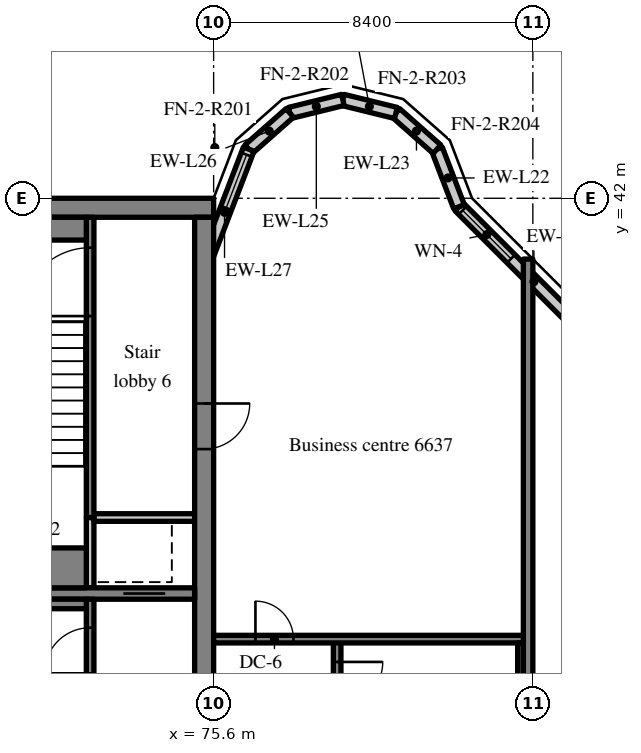
"""IFC4 building model, lengths in metres.
Left out: names, types, materials, properties, quantities, classifications, styles, units other than length and angle.
Written with IfcOpenShell. Run it as: python <this file> out.ifc"""

import sys

from ifc_helpers import new_model, si_unit, direction, frame, frame_2d, origin, place, context, subcontext, project, spatial, rectangle, extrude, source, transform, mapped, element, fill, save


model = new_model("IFC4")
c1 = context("Model", 3, precision=1e-05, world=origin(), true_north=direction((0.0, 1.0)))
c2 = subcontext(c1, "Body", "Model", "MODEL_VIEW")
j1 = project(units=[si_unit("LENGTHUNIT", "METRE"), si_unit("PLANEANGLEUNIT", "RADIAN")], contexts=[c1])
p1 = place(None, origin())
s1 = spatial("IfcSite", under=j1, at=p1, CompositionType="ELEMENT")
p2 = place(p1, origin())
s2 = spatial("IfcBuilding", under=s1, at=p2, CompositionType="ELEMENT")
p3 = place(p2, frame((0.0, 0.0, 277.7)))
s3 = spatial("IfcBuildingStorey", under=s2, at=p3, CompositionType="ELEMENT", Elevation=277.7)
m1 = source(origin(), c2, "Body", "SweptSolid", [
    extrude(rectangle(XDim=50.4, YDim=0.5, at=frame_2d((25.2, 0.0))), origin(), (0.0, 0.0, 1.0), 3.72),
])
p4 = place(p3, frame((25.2, 41.75, 0.0), z_axis=(0.0, 0.0, 1.0), x_axis=(1.0, 0.0, 0.0)))
e1 = element("IfcWall", 1, at=p4, inside=s3, PredefinedType="SHEAR", context=c2, shape_type="MappedRepresentation", body=[
    mapped(m1, transform((0.0, 0.0, 0.0), scale=1.0)),
])
m2 = source(origin(), c2, "Body", "SweptSolid", [
    extrude(rectangle(XDim=19.0, YDim=0.5, at=frame_2d((9.5, 0.0))), origin(), (0.0, 0.0, 1.0), 3.72),
])
p5 = place(p3, frame((75.35, 22.5, 0.0), z_axis=(0.0, 0.0, 1.0), x_axis=(0.0, 1.0, 0.0)))
e2 = element("IfcWall", 2, at=p5, inside=s3, PredefinedType="SHEAR", context=c2, shape_type="MappedRepresentation", body=[
    mapped(m2, transform((0.0, 0.0, 0.0), scale=1.0)),
])
m3 = source(origin(), c2, "Body", "SweptSolid", [
    extrude(rectangle(XDim=1.2, YDim=2.1, at=frame_2d((0.6, 1.05))), frame((0.0, 0.26, 0.0), z_axis=(0.0, -1.0, 0.0), x_axis=(1.0, 0.0, 0.0)), (0.0, 0.0, 1.0), 0.52),
])
p6 = place(p5, frame((12.9, 0.0, 0.0)))
e3 = element("IfcOpeningElement", 3, at=p6, cuts=e2, PredefinedType="OPENING", context=c2, shape_type="MappedRepresentation", body=[
    mapped(m3, transform((0.0, 0.0, 0.0), scale=1.0)),
])
m4 = source(origin(), c2, "Body", "SweptSolid", [
    extrude(rectangle(XDim=7.75, YDim=0.3, at=frame_2d((3.875, 0.0))), origin(), (0.0, 0.0, 1.0), 3.72),
])
p7 = place(p3, frame((67.35, 31.6, 0.0), z_axis=(0.0, 0.0, 1.0), x_axis=(1.0, 0.0, 0.0)))
e4 = element("IfcWall", 4, at=p7, inside=s3, PredefinedType="SHEAR", context=c2, shape_type="MappedRepresentation", body=[
    mapped(m4, transform((0.0, 0.0, 0.0), scale=1.0)),
])
m5 = source(origin(), c2, "Body", "SweptSolid", [
    extrude(rectangle(XDim=1.1, YDim=2.1, at=frame_2d((0.55, 1.05))), frame((0.0, 0.16, 0.0), z_axis=(0.0, -1.0, 0.0), x_axis=(1.0, 0.0, 0.0)), (0.0, 0.0, 1.0), 0.32),
])
p8 = place(p7, frame((5.875, 0.0, 0.0)))
e5 = element("IfcOpeningElement", 5, at=p8, cuts=e4, PredefinedType="OPENING", context=c2, shape_type="MappedRepresentation", body=[
    mapped(m5, transform((0.0, 0.0, 0.0), scale=1.0)),
])
m6 = source(origin(), c2, "Body", "SweptSolid", [
    extrude(rectangle(XDim=18.4, YDim=0.25, at=frame_2d((9.2, 0.0))), origin(), (0.0, 0.0, 1.0), 3.72),
])
p9 = place(p3, frame((83.875, 22.0, 0.0), z_axis=(0.0, 0.0, 1.0), x_axis=(0.0, 1.0, 0.0)))
e6 = element("IfcWall", 6, at=p9, inside=s3, PredefinedType="SHEAR", context=c2, shape_type="MappedRepresentation", body=[
    mapped(m6, transform((0.0, 0.0, 0.0), scale=1.0)),
])
m7 = source(origin(), c2, "Body", "SweptSolid", [
    extrude(rectangle(XDim=5.576, YDim=0.3, at=frame_2d((2.788, 0.0))), origin(), (0.0, 0.0, 1.0), 3.72),
])
p10 = place(p3, frame((86.0, 37.834, 0.0), z_axis=(0.0, 0.0, 1.0), x_axis=(-0.707106781187, 0.707106781187, 0.0)))
e7 = element("IfcWall", 7, at=p10, inside=s3, PredefinedType="SOLIDWALL", context=c2, shape_type="MappedRepresentation", body=[
    mapped(m7, transform((0.0, 0.0, 0.0), scale=1.0)),
])
m8 = source(origin(), c2, "Body", "SweptSolid", [
    extrude(rectangle(XDim=1.8, YDim=1.5, at=frame_2d((0.9, 0.75))), frame((0.0, 0.16, 0.0), z_axis=(0.0, -1.0, 0.0), x_axis=(1.0, 0.0, 0.0)), (0.0, 0.0, 1.0), 0.32),
])
p11 = place(p10, frame((3.641, 0.0, 0.9)))
e8 = element("IfcOpeningElement", 8, at=p11, cuts=e7, PredefinedType="OPENING", context=c2, shape_type="MappedRepresentation", body=[
    mapped(m8, transform((0.0, 0.0, 0.0), scale=1.0)),
])
m9 = source(origin(), c2, "Body", "SweptSolid", [
    extrude(rectangle(XDim=1.622, YDim=0.3, at=frame_2d((0.811, 0.0))), origin(), (0.0, 0.0, 1.0), 3.72),
])
p12 = place(p3, frame((82.057, 41.777, 0.0), z_axis=(0.0, 0.0, 1.0), x_axis=(-0.357778527068, 0.933806471154, 0.0)))
e9 = element("IfcWall", 9, at=p12, inside=s3, PredefinedType="SOLIDWALL", context=c2, shape_type="MappedRepresentation", body=[
    mapped(m9, transform((0.0, 0.0, 0.0), scale=1.0)),
])
m10 = source(origin(), c2, "Body", "SweptSolid", [
    extrude(rectangle(XDim=1.44, YDim=0.3, at=frame_2d((0.72, 0.0))), origin(), (0.0, 0.0, 1.0), 3.72),
])
p13 = place(p3, frame((81.477, 43.292, 0.0), z_axis=(0.0, 0.0, 1.0), x_axis=(-0.74957555648, 0.661918790432, 0.0)))
e10 = element("IfcWall", 10, at=p13, inside=s3, PredefinedType="SOLIDWALL", context=c2, shape_type="MappedRepresentation", body=[
    mapped(m10, transform((0.0, 0.0, 0.0), scale=1.0)),
])
m11 = source(origin(), c2, "Body", "SweptSolid", [
    extrude(rectangle(XDim=1.439, YDim=0.3, at=frame_2d((0.719, 0.0))), origin(), (0.0, 0.0, 1.0), 3.72),
])
for number, where, z_axis, x_axis in (
    (11, (80.397, 44.245, 0.0), (0.0, 0.0, 1.0), (-0.971, 0.238, 0.0)),
    (12, (79.0, 44.588, 0.0), (0.0, 0.0, 1.0), (-0.971, -0.238, 0.0)),
):
    element("IfcWall", number, at=place(p3, frame(where, z_axis=z_axis, x_axis=x_axis)), inside=s3, PredefinedType="SOLIDWALL", context=c2, shape_type="MappedRepresentation", body=[
        mapped(m11, transform((0.0, 0.0, 0.0), scale=1.0)),
    ])
p14 = place(p3, frame((77.603, 44.245, 0.0), z_axis=(0.0, 0.0, 1.0), x_axis=(-0.74957555648, -0.661918790432, 0.0)))
e13 = element("IfcWall", 13, at=p14, inside=s3, PredefinedType="SOLIDWALL", context=c2, shape_type="MappedRepresentation", body=[
    mapped(m10, transform((0.0, 0.0, 0.0), scale=1.0)),
])
m12 = source(origin(), c2, "Body", "SweptSolid", [
    extrude(rectangle(XDim=3.559, YDim=0.3, at=frame_2d((1.78, 0.0))), origin(), (0.0, 0.0, 1.0), 3.72),
])
p15 = place(p3, frame((76.523, 43.292, 0.0), z_axis=(0.0, 0.0, 1.0), x_axis=(-0.35779745313, -0.933799219604, 0.0)))
e14 = element("IfcWall", 14, at=p15, inside=s3, PredefinedType="SOLIDWALL", context=c2, shape_type="MappedRepresentation", body=[
    mapped(m12, transform((0.0, 0.0, 0.0), scale=1.0)),
])
m13 = source(origin(), c2, "Body", "SweptSolid", [
    extrude(rectangle(XDim=1.5, YDim=2.0, at=frame_2d((0.75, 1.0))), frame((0.0, 0.16, 0.0), z_axis=(0.0, -1.0, 0.0), x_axis=(1.0, 0.0, 0.0)), (0.0, 0.0, 1.0), 0.32),
])
p16 = place(p15, frame((0.156, 0.0, 0.9)))
e15 = element("IfcOpeningElement", 15, at=p16, cuts=e14, PredefinedType="OPENING", context=c2, shape_type="MappedRepresentation", body=[
    mapped(m13, transform((0.0, 0.0, 0.0), scale=1.0)),
])
m14 = source(origin(), c2, "Body", "SweptSolid", [
    extrude(rectangle(XDim=8.95, YDim=0.2, at=frame_2d((4.475, 0.0))), origin(), (0.0, 0.0, 1.0), 3.72),
])
p17 = place(p3, frame((72.35, 22.5, 0.0), z_axis=(0.0, 0.0, 1.0), x_axis=(0.0, 1.0, 0.0)))
e16 = element("IfcWall", 16, at=p17, inside=s3, PredefinedType="SOLIDWALL", context=c2, shape_type="MappedRepresentation", body=[
    mapped(m14, transform((0.0, 0.0, 0.0), scale=1.0)),
])
m15 = source(origin(), c2, "Body", "SweptSolid", [
    extrude(rectangle(XDim=1.2, YDim=2.1, at=frame_2d((0.6, 1.05))), frame((0.0, 0.11, 0.0), z_axis=(0.0, -1.0, 0.0), x_axis=(1.0, 0.0, 0.0)), (0.0, 0.0, 1.0), 0.22),
])
p18 = place(p17, frame((7.0, 0.0, 0.0)))
e17 = element("IfcOpeningElement", 17, at=p18, cuts=e16, PredefinedType="OPENING", context=c2, shape_type="MappedRepresentation", body=[
    mapped(m15, transform((0.0, 0.0, 0.0), scale=1.0)),
])
m16 = source(origin(), c2, "Body", "SweptSolid", [
    extrude(rectangle(XDim=1.85, YDim=0.2, at=frame_2d((0.925, 0.0))), origin(), (0.0, 0.0, 1.0), 3.72),
])
p19 = place(p3, frame((72.35, 31.75, 0.0), z_axis=(0.0, 0.0, 1.0), x_axis=(0.0, 1.0, 0.0)))
e18 = element("IfcWall", 18, at=p19, inside=s3, PredefinedType="SOLIDWALL", context=c2, shape_type="MappedRepresentation", body=[
    mapped(m16, transform((0.0, 0.0, 0.0), scale=1.0)),
])
m17 = source(origin(), c2, "Body", "SweptSolid", [
    extrude(rectangle(XDim=2.65, YDim=0.2, at=frame_2d((1.325, 0.0))), origin(), (0.0, 0.0, 1.0), 3.72),
])
p20 = place(p3, frame((72.45, 33.6, 0.0), z_axis=(0.0, 0.0, 1.0), x_axis=(1.0, 0.0, 0.0)))
e19 = element("IfcWall", 19, at=p20, inside=s3, PredefinedType="SOLIDWALL", context=c2, shape_type="MappedRepresentation", body=[
    mapped(m17, transform((0.0, 0.0, 0.0), scale=1.0)),
])
m18 = source(origin(), c2, "Body", "SweptSolid", [
    extrude(rectangle(XDim=7.9, YDim=0.2, at=frame_2d((3.95, 0.0))), origin(), (0.0, 0.0, 1.0), 3.72),
])
p21 = place(p3, frame((72.35, 33.6, 0.0), z_axis=(0.0, 0.0, 1.0), x_axis=(0.0, 1.0, 0.0)))
e20 = element("IfcWall", 20, at=p21, inside=s3, PredefinedType="SOLIDWALL", context=c2, shape_type="MappedRepresentation", body=[
    mapped(m18, transform((0.0, 0.0, 0.0), scale=1.0)),
])
m19 = source(origin(), c2, "Body", "SweptSolid", [
    extrude(rectangle(XDim=1.8, YDim=2.1, at=frame_2d((0.9, 1.05))), frame((0.0, 0.11, 0.0), z_axis=(0.0, -1.0, 0.0), x_axis=(1.0, 0.0, 0.0)), (0.0, 0.0, 1.0), 0.22),
])
p22 = place(p21, frame((5.3, 0.0, 0.0)))
e21 = element("IfcOpeningElement", 21, at=p22, cuts=e20, PredefinedType="OPENING", context=c2, shape_type="MappedRepresentation", body=[
    mapped(m19, transform((0.0, 0.0, 0.0), scale=1.0)),
])
m20 = source(origin(), c2, "Body", "SweptSolid", [
    extrude(rectangle(XDim=8.3, YDim=0.2, at=frame_2d((4.15, 0.0))), origin(), (0.0, 0.0, 1.0), 3.72),
])
p23 = place(p3, frame((78.85, 22.1, 0.0), z_axis=(0.0, 0.0, 1.0), x_axis=(0.0, 1.0, 0.0)))
e22 = element("IfcWall", 22, at=p23, inside=s3, PredefinedType="SOLIDWALL", context=c2, shape_type="MappedRepresentation", body=[
    mapped(m20, transform((0.0, 0.0, 0.0), scale=1.0)),
])
p24 = place(p23, frame((6.5, 0.0, 0.0)))
e23 = element("IfcOpeningElement", 23, at=p24, cuts=e22, PredefinedType="OPENING", context=c2, shape_type="MappedRepresentation", body=[
    mapped(m15, transform((0.0, 0.0, 0.0), scale=1.0)),
])
m21 = source(origin(), c2, "Body", "SweptSolid", [
    extrude(rectangle(XDim=8.15, YDim=0.2, at=frame_2d((4.075, 0.0))), origin(), (0.0, 0.0, 1.0), 3.72),
])
p25 = place(p3, frame((83.75, 30.4, 0.0), z_axis=(0.0, 0.0, 1.0), x_axis=(-1.0, 0.0, 0.0)))
e24 = element("IfcWall", 24, at=p25, inside=s3, PredefinedType="SOLIDWALL", context=c2, shape_type="MappedRepresentation", body=[
    mapped(m21, transform((0.0, 0.0, 0.0), scale=1.0)),
])
m22 = source(origin(), c2, "Body", "SweptSolid", [
    extrude(rectangle(XDim=1.0, YDim=2.1, at=frame_2d((0.5, 1.05))), frame((0.0, 0.11, 0.0), z_axis=(0.0, -1.0, 0.0), x_axis=(1.0, 0.0, 0.0)), (0.0, 0.0, 1.0), 0.22),
])
p26 = place(p25, frame((6.05, 0.0, 0.0)))
e25 = element("IfcOpeningElement", 25, at=p26, cuts=e24, PredefinedType="OPENING", context=c2, shape_type="MappedRepresentation", body=[
    mapped(m22, transform((0.0, 0.0, 0.0), scale=1.0)),
])
m23 = source(origin(), c2, "Body", "SweptSolid", [
    extrude(rectangle(XDim=4.9, YDim=0.25, at=frame_2d((2.45, 0.0))), origin(), (0.0, 0.0, 1.0), 3.72),
])
p27 = place(p3, frame((67.35, 31.325, 0.0), z_axis=(0.0, 0.0, 1.0), x_axis=(1.0, 0.0, 0.0)))
e26 = element("IfcWall", 26, at=p27, inside=s3, PredefinedType="SOLIDWALL", context=c2, shape_type="MappedRepresentation", body=[
    mapped(m23, transform((0.0, 0.0, 0.0), scale=1.0)),
])
m24 = source(origin(), c2, "Body", "SweptSolid", [
    extrude(rectangle(XDim=4.9, YDim=0.6, at=frame_2d((2.45, 0.0))), origin(), (0.0, 0.0, 1.0), 3.72),
])
p28 = place(p3, frame((67.35, 41.2, 0.0), z_axis=(0.0, 0.0, 1.0), x_axis=(1.0, 0.0, 0.0)))
e27 = element("IfcWall", 27, at=p28, inside=s3, PredefinedType="SOLIDWALL", context=c2, shape_type="MappedRepresentation", body=[
    mapped(m24, transform((0.0, 0.0, 0.0), scale=1.0)),
])
m25 = source(origin(), c2, "Body", "SweptSolid", [
    extrude(rectangle(XDim=4.9, YDim=1.05, at=frame_2d((2.45, 0.0))), origin(), (0.0, 0.0, 1.0), 3.72),
])
p29 = place(p3, frame((67.35, 32.275, 0.0), z_axis=(0.0, 0.0, 1.0), x_axis=(1.0, 0.0, 0.0)))
e28 = element("IfcWall", 28, at=p29, inside=s3, PredefinedType="SOLIDWALL", context=c2, shape_type="MappedRepresentation", body=[
    mapped(m25, transform((0.0, 0.0, 0.0), scale=1.0)),
])
m26 = source(origin(), c2, "Body", "SweptSolid", [
    extrude(rectangle(XDim=8.1, YDim=0.15, at=frame_2d((4.05, 0.0))), origin(), (0.0, 0.0, 1.0), 3.72),
])
p30 = place(p3, frame((83.675, 22.2, 0.0), z_axis=(0.0, 0.0, 1.0), x_axis=(0.0, 1.0, 0.0)))
e29 = element("IfcWall", 29, at=p30, inside=s3, PredefinedType="SOLIDWALL", context=c2, shape_type="MappedRepresentation", body=[
    mapped(m26, transform((0.0, 0.0, 0.0), scale=1.0)),
])
m27 = source(origin(), c2, "Body", "SweptSolid", [
    extrude(rectangle(XDim=1.8, YDim=1.5, at=frame_2d((0.9, 0.75))), frame((0.0, 0.03, 0.0), z_axis=(0.0, -1.0, 0.0), x_axis=(1.0, 0.0, 0.0)), (0.0, 0.0, 1.0), 0.06),
])
p31 = place(p11, origin())
e30 = element("IfcWindow", 30, at=p31, inside=s3, PartitioningType="SINGLE_PANEL", PredefinedType="WINDOW", context=c2, shape_type="MappedRepresentation", body=[
    mapped(m27, transform((0.0, 0.0, 0.0), scale=1.0)),
])
fill(e8, e30)
m28 = source(origin(), c2, "Body", "SweptSolid", [
    extrude(rectangle(XDim=1.5, YDim=2.0, at=frame_2d((0.75, 1.0))), frame((0.0, 0.03, 0.0), z_axis=(0.0, -1.0, 0.0), x_axis=(1.0, 0.0, 0.0)), (0.0, 0.0, 1.0), 0.06),
])
p32 = place(p16, origin())
e31 = element("IfcWindow", 31, at=p32, inside=s3, PartitioningType="SINGLE_PANEL", PredefinedType="WINDOW", context=c2, shape_type="MappedRepresentation", body=[
    mapped(m28, transform((0.0, 0.0, 0.0), scale=1.0)),
])
fill(e15, e31)
m29 = source(origin(), c2, "Body", "SweptSolid", [
    extrude(rectangle(XDim=1.2, YDim=2.1, at=frame_2d((0.6, 1.05))), frame((0.0, 0.025, 0.0), z_axis=(0.0, -1.0, 0.0), x_axis=(1.0, 0.0, 0.0)), (0.0, 0.0, 1.0), 0.05),
])
p33 = place(p18, origin())
e32 = element("IfcDoor", 32, at=p33, inside=s3, OperationType="SINGLE_SWING_LEFT", PredefinedType="DOOR", context=c2, shape_type="MappedRepresentation", body=[
    mapped(m29, transform((0.0, 0.0, 0.0), scale=1.0)),
])
fill(e17, e32)
m30 = source(origin(), c2, "Body", "SweptSolid", [
    extrude(rectangle(XDim=1.1, YDim=2.1, at=frame_2d((0.55, 1.05))), frame((0.0, 0.025, 0.0), z_axis=(0.0, -1.0, 0.0), x_axis=(1.0, 0.0, 0.0)), (0.0, 0.0, 1.0), 0.05),
])
p34 = place(p8, origin())
e33 = element("IfcDoor", 33, at=p34, inside=s3, OperationType="SLIDING_TO_RIGHT", PredefinedType="DOOR", context=c2, shape_type="MappedRepresentation", body=[
    mapped(m30, transform((0.0, 0.0, 0.0), scale=1.0)),
])
fill(e5, e33)
m31 = source(origin(), c2, "Body", "SweptSolid", [
    extrude(rectangle(XDim=1.8, YDim=2.1, at=frame_2d((0.9, 1.05))), frame((0.0, 0.025, 0.0), z_axis=(0.0, -1.0, 0.0), x_axis=(1.0, 0.0, 0.0)), (0.0, 0.0, 1.0), 0.05),
])
p35 = place(p22, origin())
e34 = element("IfcDoor", 34, at=p35, inside=s3, OperationType="SINGLE_SWING_LEFT", PredefinedType="DOOR", context=c2, shape_type="MappedRepresentation", body=[
    mapped(m31, transform((0.0, 0.0, 0.0), scale=1.0)),
])
fill(e21, e34)
p36 = place(p6, origin())
e35 = element("IfcDoor", 35, at=p36, inside=s3, OperationType="SINGLE_SWING_RIGHT", PredefinedType="DOOR", context=c2, shape_type="MappedRepresentation", body=[
    mapped(m29, transform((0.0, 0.0, 0.0), scale=1.0)),
])
fill(e3, e35)
p37 = place(p24, origin())
e36 = element("IfcDoor", 36, at=p37, inside=s3, OperationType="SINGLE_SWING_RIGHT", PredefinedType="DOOR", context=c2, shape_type="MappedRepresentation", body=[
    mapped(m29, transform((0.0, 0.0, 0.0), scale=1.0)),
])
fill(e23, e36)
m32 = source(origin(), c2, "Body", "SweptSolid", [
    extrude(rectangle(XDim=1.0, YDim=2.1, at=frame_2d((0.5, 1.05))), frame((0.0, 0.025, 0.0), z_axis=(0.0, -1.0, 0.0), x_axis=(1.0, 0.0, 0.0)), (0.0, 0.0, 1.0), 0.05),
])
p38 = place(p26, origin())
e37 = element("IfcDoor", 37, at=p38, inside=s3, OperationType="SINGLE_SWING_RIGHT", PredefinedType="DOOR", context=c2, shape_type="MappedRepresentation", body=[
    mapped(m32, transform((0.0, 0.0, 0.0), scale=1.0)),
])
fill(e25, e37)
save(model, sys.argv[1])
